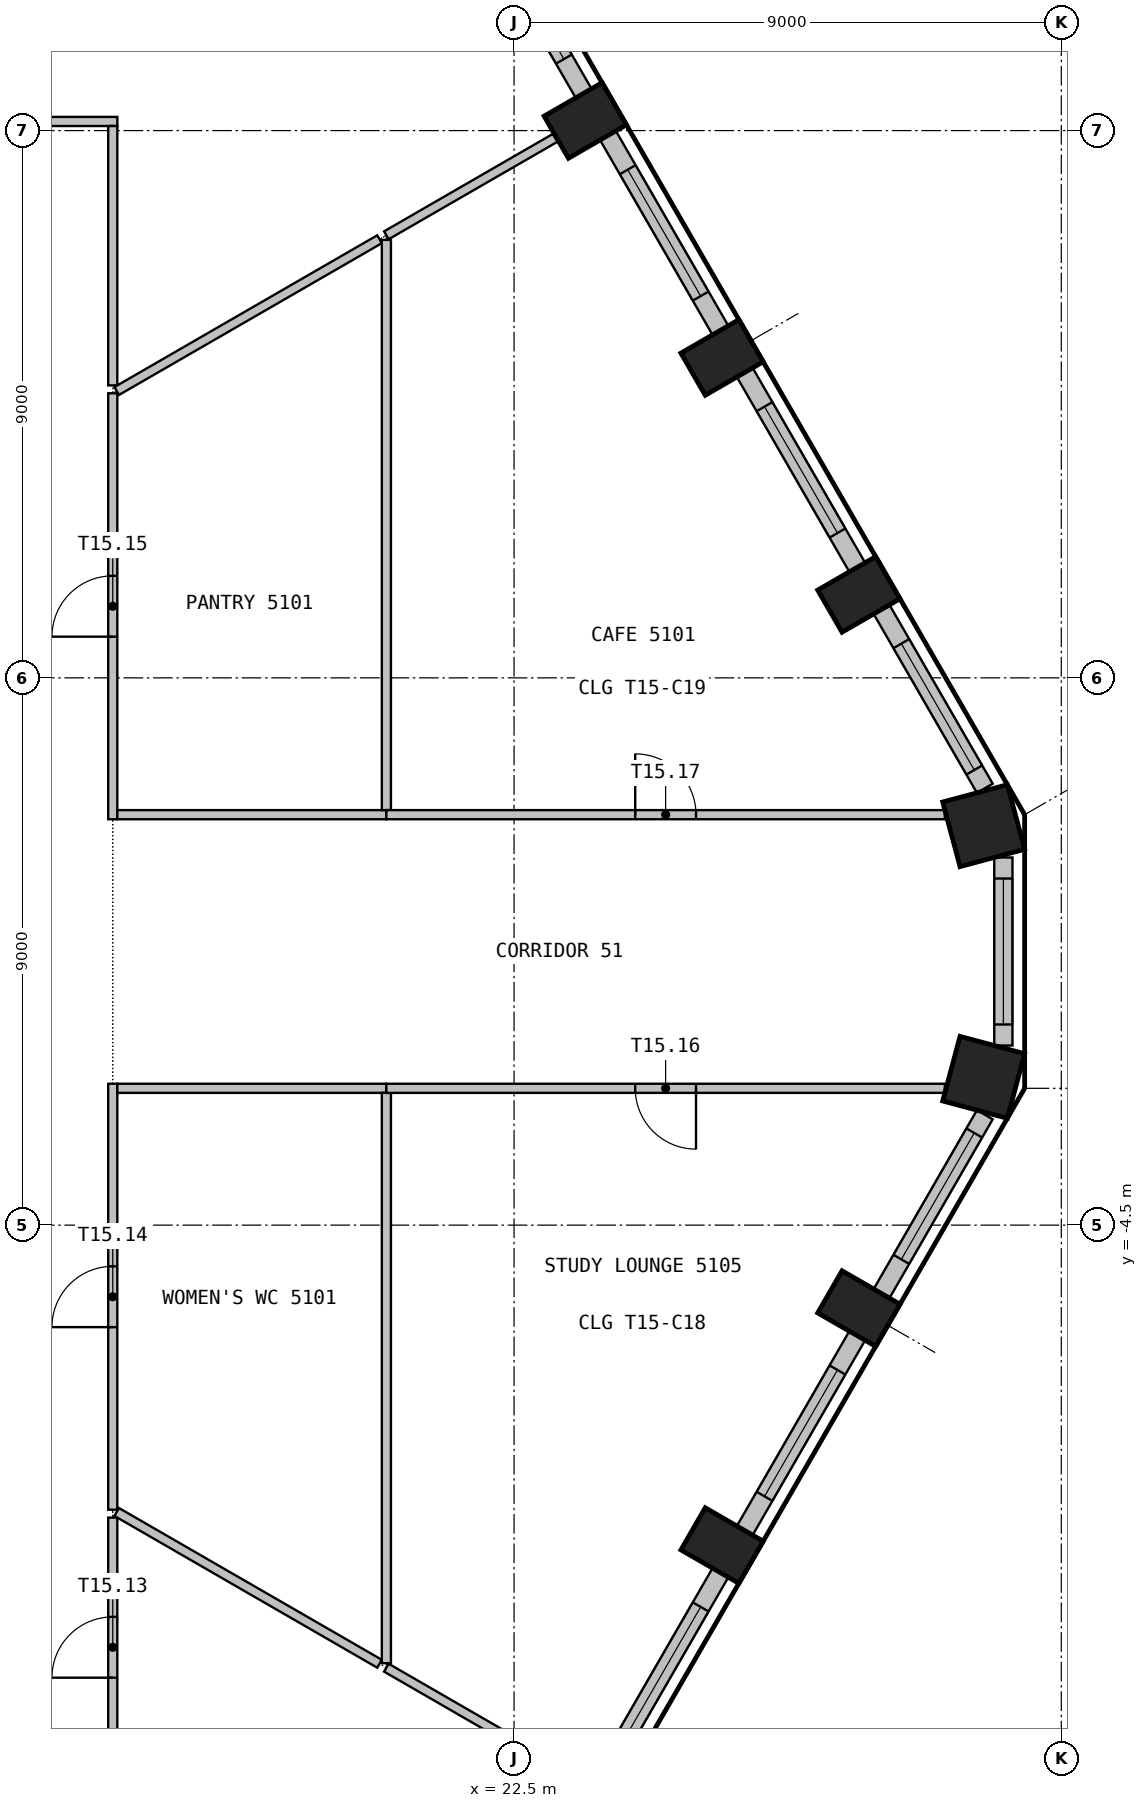
"""IFC4 building model, lengths in metres.
Left out: names, types, materials, properties, quantities, classifications, styles, units other than length and angle.
Written with IfcOpenShell. Run it as: python <this file> out.ifc"""

import sys

from ifc_helpers import new_model, si_unit, direction, frame, frame_2d, origin, origin_2d, place, context, subcontext, project, spatial, rectangle, extrude, element, fill, save


model = new_model("IFC4")
c1 = context("Model", 3, precision=1e-05, world=origin(), true_north=direction((0.0, 1.0)))
c2 = subcontext(c1, "Body", "Model", "MODEL_VIEW")
j1 = project(units=[si_unit("LENGTHUNIT", "METRE"), si_unit("PLANEANGLEUNIT", "RADIAN")], contexts=[c1])
p1 = place(None, origin())
s1 = spatial("IfcSite", under=j1, at=p1, CompositionType="ELEMENT")
p2 = place(p1, origin())
s2 = spatial("IfcBuilding", under=s1, at=p2, CompositionType="ELEMENT")
p3 = place(p2, frame((0.0, 0.0, 207.3)))
s3 = spatial("IfcBuildingStorey", under=s2, at=p3, CompositionType="ELEMENT", Elevation=207.3)
for number, where, z_axis, x_axis in (
    (1, (25.921, -9.769, 0.0), (0.0, 0.0, 1.0), (0.5, 0.866, 0.0)),
    (2, (28.171, -5.872, 0.0), (0.0, 0.0, 1.0), (0.5, 0.866, 0.0)),
):
    element("IfcColumn", number, at=place(p3, frame(where, z_axis=z_axis, x_axis=x_axis)), inside=s3, PredefinedType="COLUMN", context=c2, shape_type="SweptSolid", body=[
        extrude(rectangle(XDim=0.8, YDim=1.1, at=origin_2d()), origin(), (0.0, 0.0, 1.0), 3.55),
    ])
for number, where, z_axis, x_axis in (
    (3, (30.223, -2.07, 0.0), (0.0, 0.0, 1.0), (0.259, 0.966, 0.0)),
    (4, (30.223, 2.07, 0.0), (0.0, 0.0, 1.0), (-0.259, 0.966, 0.0)),
):
    element("IfcColumn", number, at=place(p3, frame(where, z_axis=z_axis, x_axis=x_axis)), inside=s3, PredefinedType="COLUMN", context=c2, shape_type="SweptSolid", body=[
        extrude(rectangle(XDim=1.1, YDim=1.1, at=origin_2d()), origin(), (0.0, 0.0, 1.0), 3.55),
    ])
for number, where, z_axis, x_axis in (
    (5, (28.171, 5.872, 0.0), (0.0, 0.0, 1.0), (-0.5, 0.866, 0.0)),
    (6, (25.921, 9.769, 0.0), (0.0, 0.0, 1.0), (-0.5, 0.866, 0.0)),
    (7, (23.671, 13.666, 0.0), (0.0, 0.0, 1.0), (-0.5, 0.866, 0.0)),
):
    element("IfcColumn", number, at=place(p3, frame(where, z_axis=z_axis, x_axis=x_axis)), inside=s3, PredefinedType="COLUMN", context=c2, shape_type="SweptSolid", body=[
        extrude(rectangle(XDim=0.8, YDim=1.1, at=origin_2d()), origin(), (0.0, 0.0, 1.0), 3.55),
    ])
p4 = place(p3, frame((24.044, -13.419, 0.0), z_axis=(0.0, 0.0, 1.0), x_axis=(0.500029062817, 0.866008623709, 0.0)))
e8 = element("IfcWall", 8, at=p4, inside=s3, PredefinedType="SOLIDWALL", context=c2, shape_type="SweptSolid", body=[
    extrude(rectangle(XDim=3.699, YDim=0.3, at=frame_2d((1.85, 0.0))), origin(), (0.0, 0.0, 1.0), 3.55),
])
p5 = place(p4, frame((0.649, 0.0, 0.9)))
e9 = element("IfcOpeningElement", 9, at=p5, cuts=e8, PredefinedType="OPENING", context=c2, shape_type="SweptSolid", body=[
    extrude(rectangle(XDim=2.4, YDim=2.1, at=frame_2d((1.2, 1.05))), frame((0.0, 0.16, 0.0), z_axis=(0.0, -1.0, 0.0), x_axis=(1.0, 0.0, 0.0)), (0.0, 0.0, 1.0), 0.32),
])
p6 = place(p3, frame((26.294, -9.522, 0.0), z_axis=(0.0, 0.0, 1.0), x_axis=(0.500029062817, 0.866008623709, 0.0)))
e10 = element("IfcWall", 10, at=p6, inside=s3, PredefinedType="SOLIDWALL", context=c2, shape_type="SweptSolid", body=[
    extrude(rectangle(XDim=3.699, YDim=0.3, at=frame_2d((1.85, 0.0))), origin(), (0.0, 0.0, 1.0), 3.55),
])
p7 = place(p6, frame((0.649, 0.0, 0.9)))
e11 = element("IfcOpeningElement", 11, at=p7, cuts=e10, PredefinedType="OPENING", context=c2, shape_type="SweptSolid", body=[
    extrude(rectangle(XDim=2.4, YDim=2.1, at=frame_2d((1.2, 1.05))), frame((0.0, 0.16, 0.0), z_axis=(0.0, -1.0, 0.0), x_axis=(1.0, 0.0, 0.0)), (0.0, 0.0, 1.0), 0.32),
])
p8 = place(p3, frame((28.544, -5.625, 0.0), z_axis=(0.0, 0.0, 1.0), x_axis=(0.500012868213, 0.866017974191, 0.0)))
e12 = element("IfcWall", 12, at=p8, inside=s3, PredefinedType="SOLIDWALL", context=c2, shape_type="SweptSolid", body=[
    extrude(rectangle(XDim=3.396, YDim=0.3, at=frame_2d((1.698, 0.0))), origin(), (0.0, 0.0, 1.0), 3.55),
])
p9 = place(p8, frame((0.649, 0.0, 0.9)))
e13 = element("IfcOpeningElement", 13, at=p9, cuts=e12, PredefinedType="OPENING", context=c2, shape_type="SweptSolid", body=[
    extrude(rectangle(XDim=2.4, YDim=2.1, at=frame_2d((1.2, 1.05))), frame((0.0, 0.16, 0.0), z_axis=(0.0, -1.0, 0.0), x_axis=(1.0, 0.0, 0.0)), (0.0, 0.0, 1.0), 0.32),
])
p10 = place(p3, frame((30.547, -1.546, 0.0), z_axis=(0.0, 0.0, 1.0), x_axis=(0.0, 1.0, 0.0)))
e14 = element("IfcWall", 14, at=p10, inside=s3, PredefinedType="SOLIDWALL", context=c2, shape_type="SweptSolid", body=[
    extrude(rectangle(XDim=3.093, YDim=0.3, at=frame_2d((1.546, 0.0))), origin(), (0.0, 0.0, 1.0), 3.55),
])
p11 = place(p10, frame((0.346, 0.0, 0.9)))
e15 = element("IfcOpeningElement", 15, at=p11, cuts=e14, PredefinedType="OPENING", context=c2, shape_type="SweptSolid", body=[
    extrude(rectangle(XDim=2.4, YDim=2.1, at=frame_2d((1.2, 1.05))), frame((0.0, 0.16, 0.0), z_axis=(0.0, -1.0, 0.0), x_axis=(1.0, 0.0, 0.0)), (0.0, 0.0, 1.0), 0.32),
])
p12 = place(p3, frame((30.242, 2.684, 0.0), z_axis=(0.0, 0.0, 1.0), x_axis=(-0.500012868213, 0.866017974191, 0.0)))
e16 = element("IfcWall", 16, at=p12, inside=s3, PredefinedType="SOLIDWALL", context=c2, shape_type="SweptSolid", body=[
    extrude(rectangle(XDim=3.396, YDim=0.3, at=frame_2d((1.698, 0.0))), origin(), (0.0, 0.0, 1.0), 3.55),
])
p13 = place(p12, frame((0.346, 0.0, 0.9)))
e17 = element("IfcOpeningElement", 17, at=p13, cuts=e16, PredefinedType="OPENING", context=c2, shape_type="SweptSolid", body=[
    extrude(rectangle(XDim=2.4, YDim=2.1, at=frame_2d((1.2, 1.05))), frame((0.0, 0.16, 0.0), z_axis=(0.0, -1.0, 0.0), x_axis=(1.0, 0.0, 0.0)), (0.0, 0.0, 1.0), 0.32),
])
p14 = place(p3, frame((28.144, 6.319, 0.0), z_axis=(0.0, 0.0, 1.0), x_axis=(-0.500029062817, 0.866008623709, 0.0)))
e18 = element("IfcWall", 18, at=p14, inside=s3, PredefinedType="SOLIDWALL", context=c2, shape_type="SweptSolid", body=[
    extrude(rectangle(XDim=3.699, YDim=0.3, at=frame_2d((1.85, 0.0))), origin(), (0.0, 0.0, 1.0), 3.55),
])
p15 = place(p14, frame((0.649, 0.0, 0.9)))
e19 = element("IfcOpeningElement", 19, at=p15, cuts=e18, PredefinedType="OPENING", context=c2, shape_type="SweptSolid", body=[
    extrude(rectangle(XDim=2.4, YDim=2.1, at=frame_2d((1.2, 1.05))), frame((0.0, 0.16, 0.0), z_axis=(0.0, -1.0, 0.0), x_axis=(1.0, 0.0, 0.0)), (0.0, 0.0, 1.0), 0.32),
])
p16 = place(p3, frame((25.894, 10.216, 0.0), z_axis=(0.0, 0.0, 1.0), x_axis=(-0.500029062817, 0.866008623709, 0.0)))
e20 = element("IfcWall", 20, at=p16, inside=s3, PredefinedType="SOLIDWALL", context=c2, shape_type="SweptSolid", body=[
    extrude(rectangle(XDim=3.699, YDim=0.3, at=frame_2d((1.85, 0.0))), origin(), (0.0, 0.0, 1.0), 3.55),
])
p17 = place(p16, frame((0.649, 0.0, 0.9)))
e21 = element("IfcOpeningElement", 21, at=p17, cuts=e20, PredefinedType="OPENING", context=c2, shape_type="SweptSolid", body=[
    extrude(rectangle(XDim=2.4, YDim=2.1, at=frame_2d((1.2, 1.05))), frame((0.0, 0.16, 0.0), z_axis=(0.0, -1.0, 0.0), x_axis=(1.0, 0.0, 0.0)), (0.0, 0.0, 1.0), 0.32),
])
p18 = place(p3, frame((23.644, 14.113, 0.0), z_axis=(0.0, 0.0, 1.0), x_axis=(-0.500029062817, 0.866008623709, 0.0)))
e22 = element("IfcWall", 22, at=p18, inside=s3, PredefinedType="SOLIDWALL", context=c2, shape_type="SweptSolid", body=[
    extrude(rectangle(XDim=3.699, YDim=0.3, at=frame_2d((1.85, 0.0))), origin(), (0.0, 0.0, 1.0), 3.55),
])
p19 = place(p18, frame((0.649, 0.0, 0.9)))
e23 = element("IfcOpeningElement", 23, at=p19, cuts=e22, PredefinedType="OPENING", context=c2, shape_type="SweptSolid", body=[
    extrude(rectangle(XDim=2.4, YDim=2.1, at=frame_2d((1.2, 1.05))), frame((0.0, 0.16, 0.0), z_axis=(0.0, -1.0, 0.0), x_axis=(1.0, 0.0, 0.0)), (0.0, 0.0, 1.0), 0.32),
])
p20 = place(p3, frame((15.975, 13.65, 0.0), z_axis=(0.0, 0.0, 1.0), x_axis=(-1.0, 0.0, 0.0)))
e24 = element("IfcWall", 24, at=p20, inside=s3, PredefinedType="PARTITIONING", context=c2, shape_type="SweptSolid", body=[
    extrude(rectangle(XDim=4.725, YDim=0.15, at=frame_2d((2.363, 0.0))), origin(), (0.0, 0.0, 1.0), 3.55),
])
p21 = place(p20, frame((1.863, 0.0, 0.0)))
e25 = element("IfcOpeningElement", 25, at=p21, cuts=e24, PredefinedType="OPENING", context=c2, shape_type="SweptSolid", body=[
    extrude(rectangle(XDim=1.0, YDim=2.1, at=frame_2d((0.5, 1.05))), frame((0.0, 0.085, 0.0), z_axis=(0.0, -1.0, 0.0), x_axis=(1.0, 0.0, 0.0)), (0.0, 0.0, 1.0), 0.17),
])
p22 = place(p3, frame((15.9, -13.575, 0.0), z_axis=(0.0, 0.0, 1.0), x_axis=(0.0, 1.0, 0.0)))
e26 = element("IfcWall", 26, at=p22, inside=s3, PredefinedType="PARTITIONING", context=c2, shape_type="SweptSolid", body=[
    extrude(rectangle(XDim=4.265, YDim=0.15, at=frame_2d((2.132, 0.0))), origin(), (0.0, 0.0, 1.0), 3.55),
])
p23 = place(p22, frame((1.633, 0.0, 0.0)))
e27 = element("IfcOpeningElement", 27, at=p23, cuts=e26, PredefinedType="OPENING", context=c2, shape_type="SweptSolid", body=[
    extrude(rectangle(XDim=1.0, YDim=2.1, at=frame_2d((0.5, 1.05))), frame((0.0, 0.085, 0.0), z_axis=(0.0, -1.0, 0.0), x_axis=(1.0, 0.0, 0.0)), (0.0, 0.0, 1.0), 0.17),
])
p24 = place(p3, frame((15.9, -9.18, 0.0), z_axis=(0.0, 0.0, 1.0), x_axis=(0.0, 1.0, 0.0)))
e28 = element("IfcWall", 28, at=p24, inside=s3, PredefinedType="PARTITIONING", context=c2, shape_type="SweptSolid", body=[
    extrude(rectangle(XDim=7.005, YDim=0.15, at=frame_2d((3.502, 0.0))), origin(), (0.0, 0.0, 1.0), 3.55),
])
p25 = place(p24, frame((3.002, 0.0, 0.0)))
e29 = element("IfcOpeningElement", 29, at=p25, cuts=e28, PredefinedType="OPENING", context=c2, shape_type="SweptSolid", body=[
    extrude(rectangle(XDim=1.0, YDim=2.1, at=frame_2d((0.5, 1.05))), frame((0.0, 0.085, 0.0), z_axis=(0.0, -1.0, 0.0), x_axis=(1.0, 0.0, 0.0)), (0.0, 0.0, 1.0), 0.17),
])
p26 = place(p3, frame((15.965, -9.218, 0.0), z_axis=(0.0, 0.0, 1.0), x_axis=(0.866034070548, -0.499984988425, 0.0)))
e30 = element("IfcWall", 30, at=p26, inside=s3, PredefinedType="PARTITIONING", context=c2, shape_type="SweptSolid", body=[
    extrude(rectangle(XDim=4.991, YDim=0.15, at=frame_2d((2.496, 0.0))), origin(), (0.0, 0.0, 1.0), 3.55),
])
p27 = place(p3, frame((20.4, -2.25, 0.0), z_axis=(0.0, 0.0, 1.0), x_axis=(-1.0, 0.0, 0.0)))
e31 = element("IfcWall", 31, at=p27, inside=s3, PredefinedType="PARTITIONING", context=c2, shape_type="SweptSolid", body=[
    extrude(rectangle(XDim=4.425, YDim=0.15, at=frame_2d((2.212, 0.0))), origin(), (0.0, 0.0, 1.0), 3.55),
])
p28 = place(p3, frame((15.9, 2.175, 0.0), z_axis=(0.0, 0.0, 1.0), x_axis=(0.0, 1.0, 0.0)))
e32 = element("IfcWall", 32, at=p28, inside=s3, PredefinedType="PARTITIONING", context=c2, shape_type="SweptSolid", body=[
    extrude(rectangle(XDim=7.005, YDim=0.15, at=frame_2d((3.502, 0.0))), origin(), (0.0, 0.0, 1.0), 3.55),
])
p29 = place(p28, frame((3.002, 0.0, 0.0)))
e33 = element("IfcOpeningElement", 33, at=p29, cuts=e32, PredefinedType="OPENING", context=c2, shape_type="SweptSolid", body=[
    extrude(rectangle(XDim=1.0, YDim=2.1, at=frame_2d((0.5, 1.05))), frame((0.0, 0.085, 0.0), z_axis=(0.0, -1.0, 0.0), x_axis=(1.0, 0.0, 0.0)), (0.0, 0.0, 1.0), 0.17),
])
p30 = place(p3, frame((15.975, 2.25, 0.0), z_axis=(0.0, 0.0, 1.0), x_axis=(1.0, 0.0, 0.0)))
e34 = element("IfcWall", 34, at=p30, inside=s3, PredefinedType="PARTITIONING", context=c2, shape_type="SweptSolid", body=[
    extrude(rectangle(XDim=4.425, YDim=0.15, at=frame_2d((2.212, 0.0))), origin(), (0.0, 0.0, 1.0), 3.55),
])
p31 = place(p3, frame((15.9, 9.31, 0.0), z_axis=(0.0, 0.0, 1.0), x_axis=(0.0, 1.0, 0.0)))
e35 = element("IfcWall", 35, at=p31, inside=s3, PredefinedType="PARTITIONING", context=c2, shape_type="SweptSolid", body=[
    extrude(rectangle(XDim=4.265, YDim=0.15, at=frame_2d((2.132, 0.0))), origin(), (0.0, 0.0, 1.0), 3.55),
])
p32 = place(p3, frame((20.287, 11.713, 0.0), z_axis=(0.0, 0.0, 1.0), x_axis=(-0.866034070548, -0.499984988425, 0.0)))
e36 = element("IfcWall", 36, at=p32, inside=s3, PredefinedType="PARTITIONING", context=c2, shape_type="SweptSolid", body=[
    extrude(rectangle(XDim=4.991, YDim=0.15, at=frame_2d((2.496, 0.0))), origin(), (0.0, 0.0, 1.0), 3.55),
])
p33 = place(p3, frame((20.4, -2.325, 0.0), z_axis=(0.0, 0.0, 1.0), x_axis=(0.0, -1.0, 0.0)))
e37 = element("IfcWall", 37, at=p33, inside=s3, PredefinedType="PARTITIONING", context=c2, shape_type="SweptSolid", body=[
    extrude(rectangle(XDim=9.378, YDim=0.15, at=frame_2d((4.689, 0.0))), origin(), (0.0, 0.0, 1.0), 3.55),
])
p34 = place(p3, frame((20.4, -11.778, 0.0), z_axis=(0.0, 0.0, 1.0), x_axis=(0.866089241828, -0.499889412961, 0.0)))
e38 = element("IfcWall", 38, at=p34, inside=s3, PredefinedType="PARTITIONING", context=c2, shape_type="SweptSolid", body=[
    extrude(rectangle(XDim=3.207, YDim=0.15, at=frame_2d((1.604, 0.0))), origin(), (0.0, 0.0, 1.0), 3.55),
])
p35 = place(p3, frame((29.585, -2.25, 0.0), z_axis=(0.0, 0.0, 1.0), x_axis=(-1.0, 0.0, 0.0)))
e39 = element("IfcWall", 39, at=p35, inside=s3, PredefinedType="PARTITIONING", context=c2, shape_type="SweptSolid", body=[
    extrude(rectangle(XDim=9.185, YDim=0.15, at=frame_2d((4.593, 0.0))), origin(), (0.0, 0.0, 1.0), 3.55),
])
p36 = place(p35, frame((4.093, 0.0, 0.0)))
e40 = element("IfcOpeningElement", 40, at=p36, cuts=e39, PredefinedType="OPENING", context=c2, shape_type="SweptSolid", body=[
    extrude(rectangle(XDim=1.0, YDim=2.1, at=frame_2d((0.5, 1.05))), frame((0.0, 0.085, 0.0), z_axis=(0.0, -1.0, 0.0), x_axis=(1.0, 0.0, 0.0)), (0.0, 0.0, 1.0), 0.17),
])
p37 = place(p3, frame((20.4, 11.703, 0.0), z_axis=(0.0, 0.0, 1.0), x_axis=(0.0, -1.0, 0.0)))
e41 = element("IfcWall", 41, at=p37, inside=s3, PredefinedType="PARTITIONING", context=c2, shape_type="SweptSolid", body=[
    extrude(rectangle(XDim=9.378, YDim=0.15, at=frame_2d((4.689, 0.0))), origin(), (0.0, 0.0, 1.0), 3.55),
])
p38 = place(p3, frame((20.4, 2.25, 0.0), z_axis=(0.0, 0.0, 1.0), x_axis=(1.0, 0.0, 0.0)))
e42 = element("IfcWall", 42, at=p38, inside=s3, PredefinedType="PARTITIONING", context=c2, shape_type="SweptSolid", body=[
    extrude(rectangle(XDim=9.185, YDim=0.15, at=frame_2d((4.593, 0.0))), origin(), (0.0, 0.0, 1.0), 3.55),
])
p39 = place(p38, frame((4.093, 0.0, 0.0)))
e43 = element("IfcOpeningElement", 43, at=p39, cuts=e42, PredefinedType="OPENING", context=c2, shape_type="SweptSolid", body=[
    extrude(rectangle(XDim=1.0, YDim=2.1, at=frame_2d((0.5, 1.05))), frame((0.0, 0.085, 0.0), z_axis=(0.0, -1.0, 0.0), x_axis=(1.0, 0.0, 0.0)), (0.0, 0.0, 1.0), 0.17),
])
p40 = place(p3, frame((23.177, 13.381, 0.0), z_axis=(0.0, 0.0, 1.0), x_axis=(-0.866089241828, -0.499889412961, 0.0)))
e44 = element("IfcWall", 44, at=p40, inside=s3, PredefinedType="PARTITIONING", context=c2, shape_type="SweptSolid", body=[
    extrude(rectangle(XDim=3.207, YDim=0.15, at=frame_2d((1.604, 0.0))), origin(), (0.0, 0.0, 1.0), 3.55),
])
p41 = place(p5, origin())
e45 = element("IfcWindow", 45, at=p41, inside=s3, PartitioningType="SINGLE_PANEL", PredefinedType="WINDOW", context=c2, shape_type="SweptSolid", body=[
    extrude(rectangle(XDim=2.4, YDim=2.1, at=frame_2d((1.2, 1.05))), frame((0.0, 0.03, 0.0), z_axis=(0.0, -1.0, 0.0), x_axis=(1.0, 0.0, 0.0)), (0.0, 0.0, 1.0), 0.06),
])
fill(e9, e45)
p42 = place(p7, origin())
e46 = element("IfcWindow", 46, at=p42, inside=s3, PartitioningType="SINGLE_PANEL", PredefinedType="WINDOW", context=c2, shape_type="SweptSolid", body=[
    extrude(rectangle(XDim=2.4, YDim=2.1, at=frame_2d((1.2, 1.05))), frame((0.0, 0.03, 0.0), z_axis=(0.0, -1.0, 0.0), x_axis=(1.0, 0.0, 0.0)), (0.0, 0.0, 1.0), 0.06),
])
fill(e11, e46)
p43 = place(p9, origin())
e47 = element("IfcWindow", 47, at=p43, inside=s3, PartitioningType="SINGLE_PANEL", PredefinedType="WINDOW", context=c2, shape_type="SweptSolid", body=[
    extrude(rectangle(XDim=2.4, YDim=2.1, at=frame_2d((1.2, 1.05))), frame((0.0, 0.03, 0.0), z_axis=(0.0, -1.0, 0.0), x_axis=(1.0, 0.0, 0.0)), (0.0, 0.0, 1.0), 0.06),
])
fill(e13, e47)
p44 = place(p11, origin())
e48 = element("IfcWindow", 48, at=p44, inside=s3, PartitioningType="SINGLE_PANEL", PredefinedType="WINDOW", context=c2, shape_type="SweptSolid", body=[
    extrude(rectangle(XDim=2.4, YDim=2.1, at=frame_2d((1.2, 1.05))), frame((0.0, 0.03, 0.0), z_axis=(0.0, -1.0, 0.0), x_axis=(1.0, 0.0, 0.0)), (0.0, 0.0, 1.0), 0.06),
])
fill(e15, e48)
p45 = place(p13, origin())
e49 = element("IfcWindow", 49, at=p45, inside=s3, PartitioningType="SINGLE_PANEL", PredefinedType="WINDOW", context=c2, shape_type="SweptSolid", body=[
    extrude(rectangle(XDim=2.4, YDim=2.1, at=frame_2d((1.2, 1.05))), frame((0.0, 0.03, 0.0), z_axis=(0.0, -1.0, 0.0), x_axis=(1.0, 0.0, 0.0)), (0.0, 0.0, 1.0), 0.06),
])
fill(e17, e49)
p46 = place(p15, origin())
e50 = element("IfcWindow", 50, at=p46, inside=s3, PartitioningType="SINGLE_PANEL", PredefinedType="WINDOW", context=c2, shape_type="SweptSolid", body=[
    extrude(rectangle(XDim=2.4, YDim=2.1, at=frame_2d((1.2, 1.05))), frame((0.0, 0.03, 0.0), z_axis=(0.0, -1.0, 0.0), x_axis=(1.0, 0.0, 0.0)), (0.0, 0.0, 1.0), 0.06),
])
fill(e19, e50)
p47 = place(p17, origin())
e51 = element("IfcWindow", 51, at=p47, inside=s3, PartitioningType="SINGLE_PANEL", PredefinedType="WINDOW", context=c2, shape_type="SweptSolid", body=[
    extrude(rectangle(XDim=2.4, YDim=2.1, at=frame_2d((1.2, 1.05))), frame((0.0, 0.03, 0.0), z_axis=(0.0, -1.0, 0.0), x_axis=(1.0, 0.0, 0.0)), (0.0, 0.0, 1.0), 0.06),
])
fill(e21, e51)
p48 = place(p19, origin())
e52 = element("IfcWindow", 52, at=p48, inside=s3, PartitioningType="SINGLE_PANEL", PredefinedType="WINDOW", context=c2, shape_type="SweptSolid", body=[
    extrude(rectangle(XDim=2.4, YDim=2.1, at=frame_2d((1.2, 1.05))), frame((0.0, 0.03, 0.0), z_axis=(0.0, -1.0, 0.0), x_axis=(1.0, 0.0, 0.0)), (0.0, 0.0, 1.0), 0.06),
])
fill(e23, e52)
p49 = place(p23, origin())
e53 = element("IfcDoor", 53, at=p49, inside=s3, OperationType="SINGLE_SWING_RIGHT", PredefinedType="DOOR", context=c2, shape_type="SweptSolid", body=[
    extrude(rectangle(XDim=1.0, YDim=2.1, at=frame_2d((0.5, 1.05))), frame((0.0, 0.025, 0.0), z_axis=(0.0, -1.0, 0.0), x_axis=(1.0, 0.0, 0.0)), (0.0, 0.0, 1.0), 0.05),
])
fill(e27, e53)
p50 = place(p25, origin())
e54 = element("IfcDoor", 54, at=p50, inside=s3, OperationType="SINGLE_SWING_RIGHT", PredefinedType="DOOR", context=c2, shape_type="SweptSolid", body=[
    extrude(rectangle(XDim=1.0, YDim=2.1, at=frame_2d((0.5, 1.05))), frame((0.0, 0.025, 0.0), z_axis=(0.0, -1.0, 0.0), x_axis=(1.0, 0.0, 0.0)), (0.0, 0.0, 1.0), 0.05),
])
fill(e29, e54)
p51 = place(p29, origin())
e55 = element("IfcDoor", 55, at=p51, inside=s3, OperationType="SINGLE_SWING_LEFT", PredefinedType="DOOR", context=c2, shape_type="SweptSolid", body=[
    extrude(rectangle(XDim=1.0, YDim=2.1, at=frame_2d((0.5, 1.05))), frame((0.0, 0.025, 0.0), z_axis=(0.0, -1.0, 0.0), x_axis=(1.0, 0.0, 0.0)), (0.0, 0.0, 1.0), 0.05),
])
fill(e33, e55)
p52 = place(p36, origin())
e56 = element("IfcDoor", 56, at=p52, inside=s3, OperationType="SINGLE_SWING_RIGHT", PredefinedType="DOOR", context=c2, shape_type="SweptSolid", body=[
    extrude(rectangle(XDim=1.0, YDim=2.1, at=frame_2d((0.5, 1.05))), frame((0.0, 0.025, 0.0), z_axis=(0.0, -1.0, 0.0), x_axis=(1.0, 0.0, 0.0)), (0.0, 0.0, 1.0), 0.05),
])
fill(e40, e56)
p53 = place(p39, origin())
e57 = element("IfcDoor", 57, at=p53, inside=s3, OperationType="SINGLE_SWING_LEFT", PredefinedType="DOOR", context=c2, shape_type="SweptSolid", body=[
    extrude(rectangle(XDim=1.0, YDim=2.1, at=frame_2d((0.5, 1.05))), frame((0.0, 0.025, 0.0), z_axis=(0.0, -1.0, 0.0), x_axis=(1.0, 0.0, 0.0)), (0.0, 0.0, 1.0), 0.05),
])
fill(e43, e57)
save(model, sys.argv[1])
